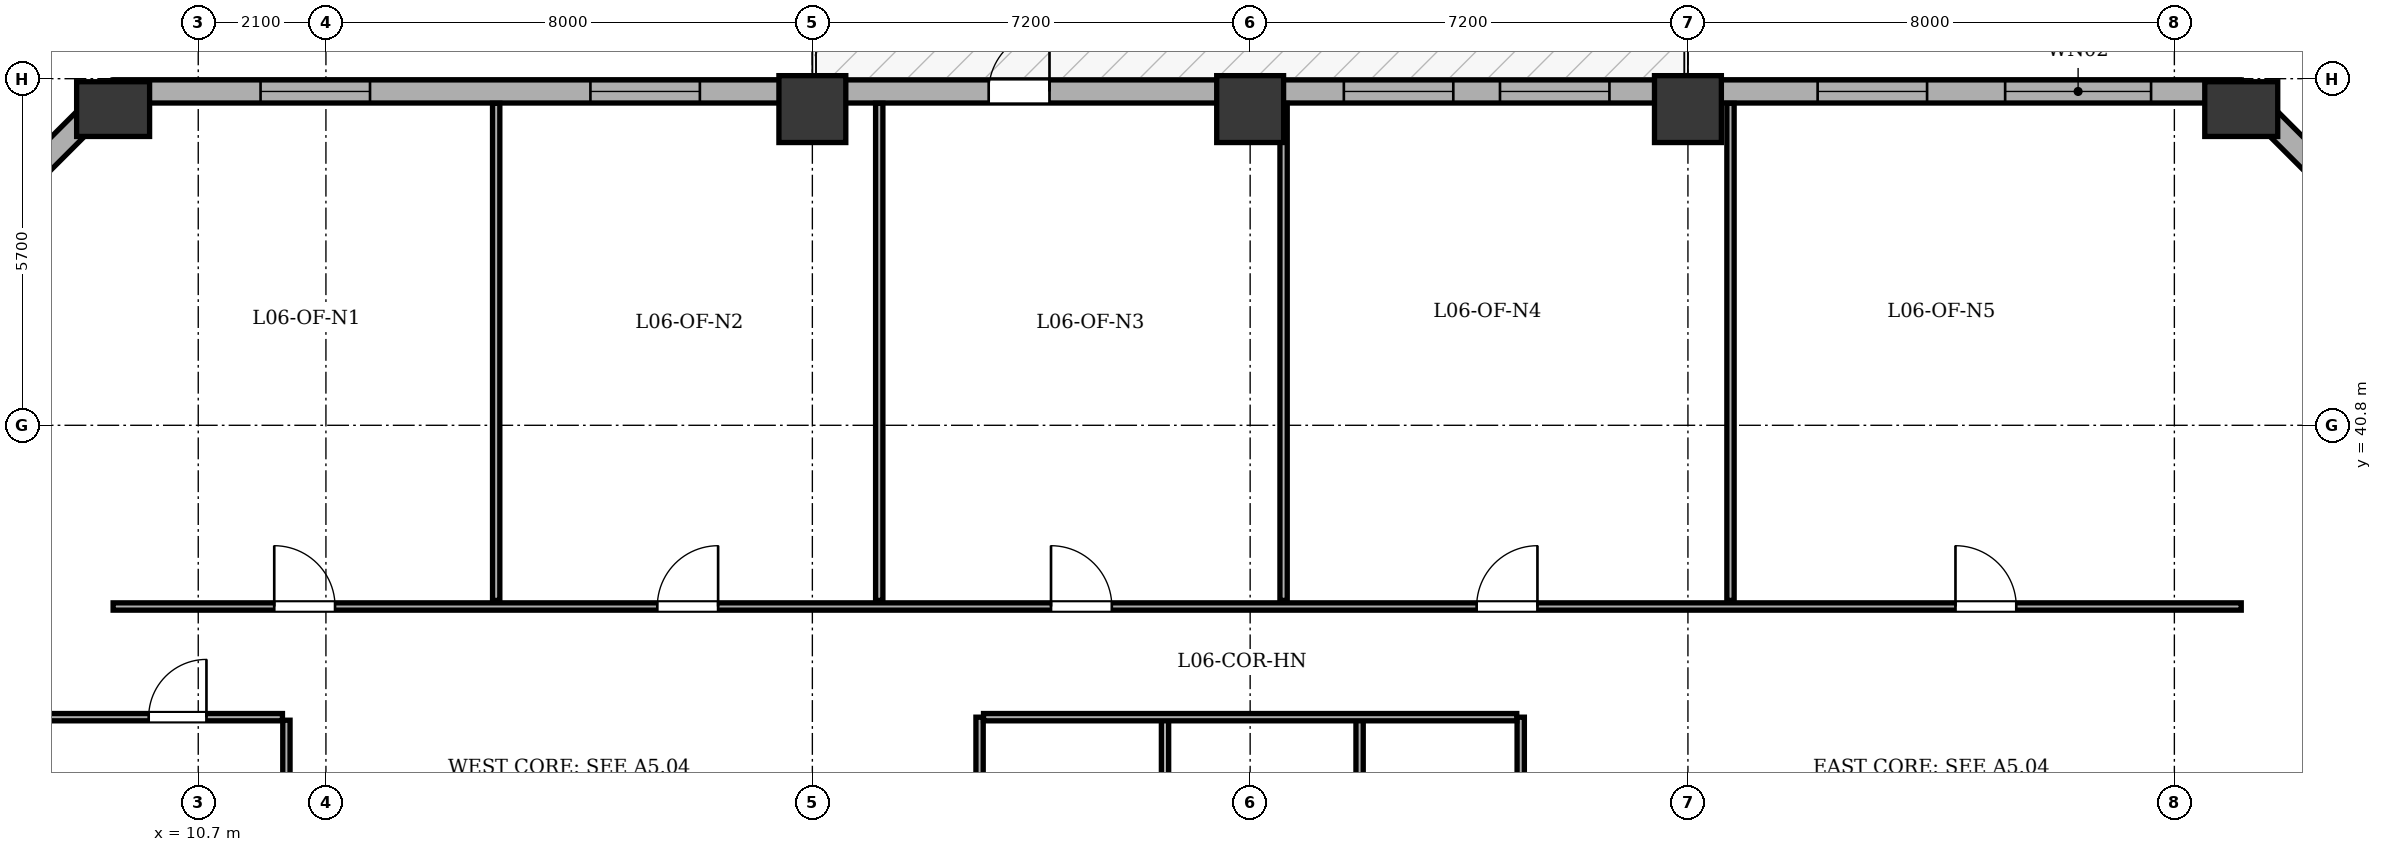
"""IFC4 building model, lengths in metres.
Left out: names, types, materials, properties, quantities, classifications, styles, units other than length and angle.
Written with IfcOpenShell. Run it as: python <this file> out.ifc"""

import sys

from ifc_helpers import new_model, si_unit, direction, frame, frame_2d, origin, origin_2d, place, context, subcontext, project, spatial, rectangle, extrude, element, fill, save


model = new_model("IFC4")
c1 = context("Model", 3, precision=1e-05, world=origin(), true_north=direction((0.0, 1.0)))
c2 = subcontext(c1, "Body", "Model", "MODEL_VIEW")
j1 = project(units=[si_unit("LENGTHUNIT", "METRE"), si_unit("PLANEANGLEUNIT", "RADIAN")], contexts=[c1])
p1 = place(None, origin())
s1 = spatial("IfcSite", under=j1, at=p1, CompositionType="ELEMENT")
p2 = place(p1, origin())
s2 = spatial("IfcBuilding", under=s1, at=p2, CompositionType="ELEMENT")
p3 = place(p2, frame((0.0, 0.0, 28.2)))
s3 = spatial("IfcBuildingStorey", under=s2, at=p3, CompositionType="ELEMENT", Elevation=28.2)
p4 = place(p3, frame((9.3, 46.0, 0.0), z_axis=(0.0, 0.0, 1.0), x_axis=(1.0, 0.0, 0.0)))
e1 = element("IfcColumn", 1, at=p4, inside=s3, PredefinedType="COLUMN", context=c2, shape_type="SweptSolid", body=[
    extrude(rectangle(XDim=0.9, YDim=1.2, at=origin_2d()), origin(), (0.0, 0.0, 1.0), 3.9),
])
for number, where, z_axis, x_axis in (
    (2, (20.8, 46.0, 0.0), (0.0, 0.0, 1.0), (1.0, 0.0, 0.0)),
    (3, (28.0, 46.0, 0.0), (0.0, 0.0, 1.0), (1.0, 0.0, 0.0)),
    (4, (35.2, 46.0, 0.0), (0.0, 0.0, 1.0), (1.0, 0.0, 0.0)),
):
    element("IfcColumn", number, at=place(p3, frame(where, z_axis=z_axis, x_axis=x_axis)), inside=s3, PredefinedType="COLUMN", context=c2, shape_type="SweptSolid", body=[
        extrude(rectangle(XDim=1.1, YDim=1.1, at=origin_2d()), origin(), (0.0, 0.0, 1.0), 3.9),
    ])
p5 = place(p3, frame((44.3, 46.0, 0.0), z_axis=(0.0, 0.0, 1.0), x_axis=(1.0, 0.0, 0.0)))
e5 = element("IfcColumn", 5, at=p5, inside=s3, PredefinedType="COLUMN", context=c2, shape_type="SweptSolid", body=[
    extrude(rectangle(XDim=0.9, YDim=1.2, at=origin_2d()), origin(), (0.0, 0.0, 1.0), 3.9),
])
p6 = place(p3, frame((4.51, 41.5, 0.0), z_axis=(0.0, 0.0, 1.0), x_axis=(0.707106781187, 0.707106781187, 0.0)))
e6 = element("IfcWall", 6, at=p6, inside=s3, PredefinedType="STANDARD", context=c2, shape_type="SweptSolid", body=[
    extrude(rectangle(XDim=6.774, YDim=0.38, at=frame_2d((3.387, 0.0))), origin(), (0.0, 0.0, 1.0), 3.135),
])
p7 = place(p6, frame((2.687, 0.0, 0.8)))
e7 = element("IfcOpeningElement", 7, at=p7, cuts=e6, PredefinedType="OPENING", context=c2, shape_type="SweptSolid", body=[
    extrude(rectangle(XDim=1.4, YDim=1.65, at=frame_2d((0.7, 0.825))), frame((0.0, 0.2, 0.0), z_axis=(0.0, -1.0, 0.0), x_axis=(1.0, 0.0, 0.0)), (0.0, 0.0, 1.0), 0.4),
])
p8 = place(p3, frame((9.3, 46.29, 0.0), z_axis=(0.0, 0.0, 1.0), x_axis=(1.0, 0.0, 0.0)))
e8 = element("IfcWall", 8, at=p8, inside=s3, PredefinedType="STANDARD", context=c2, shape_type="SweptSolid", body=[
    extrude(rectangle(XDim=35.0, YDim=0.38, at=frame_2d((17.5, 0.0))), origin(), (0.0, 0.0, 1.0), 3.135),
])
p9 = place(p8, frame((14.4, 0.0, 0.0)))
e9 = element("IfcOpeningElement", 9, at=p9, cuts=e8, PredefinedType="OPENING", context=c2, shape_type="SweptSolid", body=[
    extrude(rectangle(XDim=1.0, YDim=2.02, at=frame_2d((0.5, 1.01))), frame((0.0, 0.2, 0.0), z_axis=(0.0, -1.0, 0.0), x_axis=(1.0, 0.0, 0.0)), (0.0, 0.0, 1.0), 0.4),
])
p10 = place(p8, frame((2.425, 0.0, 0.8)))
e10 = element("IfcOpeningElement", 10, at=p10, cuts=e8, PredefinedType="OPENING", context=c2, shape_type="SweptSolid", body=[
    extrude(rectangle(XDim=1.8, YDim=1.9, at=frame_2d((0.9, 0.95))), frame((0.0, 0.2, 0.0), z_axis=(0.0, -1.0, 0.0), x_axis=(1.0, 0.0, 0.0)), (0.0, 0.0, 1.0), 0.4),
])
p11 = place(p8, frame((7.85, 0.0, 0.8)))
e11 = element("IfcOpeningElement", 11, at=p11, cuts=e8, PredefinedType="OPENING", context=c2, shape_type="SweptSolid", body=[
    extrude(rectangle(XDim=1.8, YDim=1.9, at=frame_2d((0.9, 0.95))), frame((0.0, 0.2, 0.0), z_axis=(0.0, -1.0, 0.0), x_axis=(1.0, 0.0, 0.0)), (0.0, 0.0, 1.0), 0.4),
])
p12 = place(p8, frame((20.241, 0.0, 0.8)))
e12 = element("IfcOpeningElement", 12, at=p12, cuts=e8, PredefinedType="OPENING", context=c2, shape_type="SweptSolid", body=[
    extrude(rectangle(XDim=1.8, YDim=1.9, at=frame_2d((0.9, 0.95))), frame((0.0, 0.2, 0.0), z_axis=(0.0, -1.0, 0.0), x_axis=(1.0, 0.0, 0.0)), (0.0, 0.0, 1.0), 0.4),
])
p13 = place(p8, frame((22.809, 0.0, 0.8)))
e13 = element("IfcOpeningElement", 13, at=p13, cuts=e8, PredefinedType="OPENING", context=c2, shape_type="SweptSolid", body=[
    extrude(rectangle(XDim=1.8, YDim=1.9, at=frame_2d((0.9, 0.95))), frame((0.0, 0.2, 0.0), z_axis=(0.0, -1.0, 0.0), x_axis=(1.0, 0.0, 0.0)), (0.0, 0.0, 1.0), 0.4),
])
p14 = place(p8, frame((28.033, 0.0, 0.8)))
e14 = element("IfcOpeningElement", 14, at=p14, cuts=e8, PredefinedType="OPENING", context=c2, shape_type="SweptSolid", body=[
    extrude(rectangle(XDim=1.8, YDim=1.9, at=frame_2d((0.9, 0.95))), frame((0.0, 0.2, 0.0), z_axis=(0.0, -1.0, 0.0), x_axis=(1.0, 0.0, 0.0)), (0.0, 0.0, 1.0), 0.4),
])
p15 = place(p8, frame((31.117, 0.0, 0.8)))
e15 = element("IfcOpeningElement", 15, at=p15, cuts=e8, PredefinedType="OPENING", context=c2, shape_type="SweptSolid", body=[
    extrude(rectangle(XDim=2.4, YDim=1.9, at=frame_2d((1.2, 0.95))), frame((0.0, 0.2, 0.0), z_axis=(0.0, -1.0, 0.0), x_axis=(1.0, 0.0, 0.0)), (0.0, 0.0, 1.0), 0.4),
])
p16 = place(p3, frame((44.3, 46.29, 0.0), z_axis=(0.0, 0.0, 1.0), x_axis=(0.707106781187, -0.707106781187, 0.0)))
e16 = element("IfcWall", 16, at=p16, inside=s3, PredefinedType="STANDARD", context=c2, shape_type="SweptSolid", body=[
    extrude(rectangle(XDim=6.774, YDim=0.38, at=frame_2d((3.387, 0.0))), origin(), (0.0, 0.0, 1.0), 3.135),
])
p17 = place(p16, frame((2.687, 0.0, 0.8)))
e17 = element("IfcOpeningElement", 17, at=p17, cuts=e16, PredefinedType="OPENING", context=c2, shape_type="SweptSolid", body=[
    extrude(rectangle(XDim=1.4, YDim=1.65, at=frame_2d((0.7, 0.825))), frame((0.0, 0.2, 0.0), z_axis=(0.0, -1.0, 0.0), x_axis=(1.0, 0.0, 0.0)), (0.0, 0.0, 1.0), 0.4),
])
for number, where, z_axis, x_axis in (
    (18, (23.55, 24.715, 0.0), (0.0, 0.0, 1.0), (0.0, 1.0, 0.0)),
    (19, (32.45, 24.715, 0.0), (0.0, 0.0, 1.0), (0.0, 1.0, 0.0)),
    (20, (26.6, 24.715, 0.0), (0.0, 0.0, 1.0), (0.0, 1.0, 0.0)),
):
    element("IfcWall", number, at=place(p3, frame(where, z_axis=z_axis, x_axis=x_axis)), inside=s3, PredefinedType="PARTITIONING", context=c2, shape_type="SweptSolid", body=[
        extrude(rectangle(XDim=11.285, YDim=0.12, at=frame_2d((5.643, 0.0))), origin(), (0.0, 0.0, 1.0), 3.6),
    ])
p18 = place(p3, frame((29.8, 24.715, 0.0), z_axis=(0.0, 0.0, 1.0), x_axis=(0.0, 1.0, 0.0)))
e21 = element("IfcWall", 21, at=p18, inside=s3, PredefinedType="PARTITIONING", context=c2, shape_type="SweptSolid", body=[
    extrude(rectangle(XDim=11.285, YDim=0.12, at=frame_2d((5.643, 0.0))), origin(), (0.0, 0.0, 1.0), 3.135),
])
p19 = place(p3, frame((23.615, 36.0, 0.0), z_axis=(0.0, 0.0, 1.0), x_axis=(1.0, 0.0, 0.0)))
e22 = element("IfcWall", 22, at=p19, inside=s3, PredefinedType="PARTITIONING", context=c2, shape_type="SweptSolid", body=[
    extrude(rectangle(XDim=8.77, YDim=0.12, at=frame_2d((4.385, 0.0))), origin(), (0.0, 0.0, 1.0), 3.6),
])
p20 = place(p3, frame((9.3, 37.82, 0.0), z_axis=(0.0, 0.0, 1.0), x_axis=(1.0, 0.0, 0.0)))
e23 = element("IfcWall", 23, at=p20, inside=s3, PredefinedType="PARTITIONING", context=c2, shape_type="SweptSolid", body=[
    extrude(rectangle(XDim=35.0, YDim=0.12, at=frame_2d((17.5, 0.0))), origin(), (0.0, 0.0, 1.0), 3.6),
])
p21 = place(p20, frame((2.65, 0.0, 0.0)))
e24 = element("IfcOpeningElement", 24, at=p21, cuts=e23, PredefinedType="OPENING", context=c2, shape_type="SweptSolid", body=[
    extrude(rectangle(XDim=1.0, YDim=2.1, at=frame_2d((0.5, 1.05))), frame((0.0, 0.07, 0.0), z_axis=(0.0, -1.0, 0.0), x_axis=(1.0, 0.0, 0.0)), (0.0, 0.0, 1.0), 0.14),
])
p22 = place(p20, frame((8.95, 0.0, 0.0)))
e25 = element("IfcOpeningElement", 25, at=p22, cuts=e23, PredefinedType="OPENING", context=c2, shape_type="SweptSolid", body=[
    extrude(rectangle(XDim=1.0, YDim=2.1, at=frame_2d((0.5, 1.05))), frame((0.0, 0.07, 0.0), z_axis=(0.0, -1.0, 0.0), x_axis=(1.0, 0.0, 0.0)), (0.0, 0.0, 1.0), 0.14),
])
p23 = place(p20, frame((15.425, 0.0, 0.0)))
e26 = element("IfcOpeningElement", 26, at=p23, cuts=e23, PredefinedType="OPENING", context=c2, shape_type="SweptSolid", body=[
    extrude(rectangle(XDim=1.0, YDim=2.1, at=frame_2d((0.5, 1.05))), frame((0.0, 0.07, 0.0), z_axis=(0.0, -1.0, 0.0), x_axis=(1.0, 0.0, 0.0)), (0.0, 0.0, 1.0), 0.14),
])
p24 = place(p20, frame((22.425, 0.0, 0.0)))
e27 = element("IfcOpeningElement", 27, at=p24, cuts=e23, PredefinedType="OPENING", context=c2, shape_type="SweptSolid", body=[
    extrude(rectangle(XDim=1.0, YDim=2.1, at=frame_2d((0.5, 1.05))), frame((0.0, 0.07, 0.0), z_axis=(0.0, -1.0, 0.0), x_axis=(1.0, 0.0, 0.0)), (0.0, 0.0, 1.0), 0.14),
])
p25 = place(p20, frame((30.3, 0.0, 0.0)))
e28 = element("IfcOpeningElement", 28, at=p25, cuts=e23, PredefinedType="OPENING", context=c2, shape_type="SweptSolid", body=[
    extrude(rectangle(XDim=1.0, YDim=2.1, at=frame_2d((0.5, 1.05))), frame((0.0, 0.07, 0.0), z_axis=(0.0, -1.0, 0.0), x_axis=(1.0, 0.0, 0.0)), (0.0, 0.0, 1.0), 0.14),
])
for number, where, z_axis, x_axis in (
    (29, (15.6, 37.92, 0.0), (0.0, 0.0, 1.0), (0.0, 1.0, 0.0)),
    (30, (21.9, 37.92, 0.0), (0.0, 0.0, 1.0), (0.0, 1.0, 0.0)),
    (31, (28.55, 37.92, 0.0), (0.0, 0.0, 1.0), (0.0, 1.0, 0.0)),
    (32, (35.9, 37.92, 0.0), (0.0, 0.0, 1.0), (0.0, 1.0, 0.0)),
):
    element("IfcWall", number, at=place(p3, frame(where, z_axis=z_axis, x_axis=x_axis)), inside=s3, PredefinedType="PARTITIONING", context=c2, shape_type="SweptSolid", body=[
        extrude(rectangle(XDim=8.175, YDim=0.12, at=frame_2d((4.087, 0.0))), origin(), (0.0, 0.0, 1.0), 3.6),
    ])
p26 = place(p3, frame((12.15, 18.45, 0.0), z_axis=(0.0, 0.0, 1.0), x_axis=(0.0, 1.0, 0.0)))
e33 = element("IfcWall", 33, at=p26, inside=s3, PredefinedType="PARTITIONING", context=c2, shape_type="SweptSolid", body=[
    extrude(rectangle(XDim=17.5, YDim=0.12, at=frame_2d((8.75, 0.0))), origin(), (0.0, 0.0, 1.0), 3.6),
])
p27 = place(p3, frame((4.705, 36.0, 0.0), z_axis=(0.0, 0.0, 1.0), x_axis=(1.0, 0.0, 0.0)))
e34 = element("IfcWall", 34, at=p27, inside=s3, PredefinedType="PARTITIONING", context=c2, shape_type="SweptSolid", body=[
    extrude(rectangle(XDim=7.38, YDim=0.12, at=frame_2d((3.69, 0.0))), origin(), (0.0, 0.0, 1.0), 3.6),
])
p28 = place(p27, frame((5.18, 0.0, 0.0)))
e35 = element("IfcOpeningElement", 35, at=p28, cuts=e34, PredefinedType="OPENING", context=c2, shape_type="SweptSolid", body=[
    extrude(rectangle(XDim=0.95, YDim=2.1, at=frame_2d((0.475, 1.05))), frame((0.0, 0.07, 0.0), z_axis=(0.0, -1.0, 0.0), x_axis=(1.0, 0.0, 0.0)), (0.0, 0.0, 1.0), 0.14),
])
p29 = place(p9, origin())
e36 = element("IfcDoor", 36, at=p29, inside=s3, OperationType="SINGLE_SWING_RIGHT", PredefinedType="DOOR", context=c2, shape_type="SweptSolid", body=[
    extrude(rectangle(XDim=1.0, YDim=2.02, at=frame_2d((0.5, 1.01))), frame((0.0, 0.025, 0.0), z_axis=(0.0, -1.0, 0.0), x_axis=(1.0, 0.0, 0.0)), (0.0, 0.0, 1.0), 0.05),
])
fill(e9, e36)
p30 = place(p10, origin())
e37 = element("IfcWindow", 37, at=p30, inside=s3, PartitioningType="SINGLE_PANEL", PredefinedType="WINDOW", context=c2, shape_type="SweptSolid", body=[
    extrude(rectangle(XDim=1.8, YDim=1.9, at=frame_2d((0.9, 0.95))), frame((0.0, -0.01, 0.0), z_axis=(0.0, -1.0, 0.0), x_axis=(1.0, 0.0, 0.0)), (0.0, 0.0, 1.0), 0.06),
])
fill(e10, e37)
p31 = place(p11, origin())
e38 = element("IfcWindow", 38, at=p31, inside=s3, PartitioningType="SINGLE_PANEL", PredefinedType="WINDOW", context=c2, shape_type="SweptSolid", body=[
    extrude(rectangle(XDim=1.8, YDim=1.9, at=frame_2d((0.9, 0.95))), frame((0.0, -0.01, 0.0), z_axis=(0.0, -1.0, 0.0), x_axis=(1.0, 0.0, 0.0)), (0.0, 0.0, 1.0), 0.06),
])
fill(e11, e38)
p32 = place(p12, origin())
e39 = element("IfcWindow", 39, at=p32, inside=s3, PartitioningType="SINGLE_PANEL", PredefinedType="WINDOW", context=c2, shape_type="SweptSolid", body=[
    extrude(rectangle(XDim=1.8, YDim=1.9, at=frame_2d((0.9, 0.95))), frame((0.0, -0.01, 0.0), z_axis=(0.0, -1.0, 0.0), x_axis=(1.0, 0.0, 0.0)), (0.0, 0.0, 1.0), 0.06),
])
fill(e12, e39)
p33 = place(p13, origin())
e40 = element("IfcWindow", 40, at=p33, inside=s3, PartitioningType="SINGLE_PANEL", PredefinedType="WINDOW", context=c2, shape_type="SweptSolid", body=[
    extrude(rectangle(XDim=1.8, YDim=1.9, at=frame_2d((0.9, 0.95))), frame((0.0, -0.01, 0.0), z_axis=(0.0, -1.0, 0.0), x_axis=(1.0, 0.0, 0.0)), (0.0, 0.0, 1.0), 0.06),
])
fill(e13, e40)
p34 = place(p14, origin())
e41 = element("IfcWindow", 41, at=p34, inside=s3, PartitioningType="SINGLE_PANEL", PredefinedType="WINDOW", context=c2, shape_type="SweptSolid", body=[
    extrude(rectangle(XDim=1.8, YDim=1.9, at=frame_2d((0.9, 0.95))), frame((0.0, -0.01, 0.0), z_axis=(0.0, -1.0, 0.0), x_axis=(1.0, 0.0, 0.0)), (0.0, 0.0, 1.0), 0.06),
])
fill(e14, e41)
p35 = place(p15, origin())
e42 = element("IfcWindow", 42, at=p35, inside=s3, PartitioningType="SINGLE_PANEL", PredefinedType="WINDOW", context=c2, shape_type="SweptSolid", body=[
    extrude(rectangle(XDim=2.4, YDim=1.9, at=frame_2d((1.2, 0.95))), frame((0.0, -0.01, 0.0), z_axis=(0.0, -1.0, 0.0), x_axis=(1.0, 0.0, 0.0)), (0.0, 0.0, 1.0), 0.06),
])
fill(e15, e42)
p36 = place(p21, origin())
e43 = element("IfcDoor", 43, at=p36, inside=s3, OperationType="SINGLE_SWING_LEFT", PredefinedType="DOOR", context=c2, shape_type="SweptSolid", body=[
    extrude(rectangle(XDim=1.0, YDim=2.1, at=frame_2d((0.5, 1.05))), frame((0.0, 0.025, 0.0), z_axis=(0.0, -1.0, 0.0), x_axis=(1.0, 0.0, 0.0)), (0.0, 0.0, 1.0), 0.05),
])
fill(e24, e43)
p37 = place(p22, origin())
e44 = element("IfcDoor", 44, at=p37, inside=s3, OperationType="SINGLE_SWING_RIGHT", PredefinedType="DOOR", context=c2, shape_type="SweptSolid", body=[
    extrude(rectangle(XDim=1.0, YDim=2.1, at=frame_2d((0.5, 1.05))), frame((0.0, 0.025, 0.0), z_axis=(0.0, -1.0, 0.0), x_axis=(1.0, 0.0, 0.0)), (0.0, 0.0, 1.0), 0.05),
])
fill(e25, e44)
p38 = place(p23, origin())
e45 = element("IfcDoor", 45, at=p38, inside=s3, OperationType="SINGLE_SWING_LEFT", PredefinedType="DOOR", context=c2, shape_type="SweptSolid", body=[
    extrude(rectangle(XDim=1.0, YDim=2.1, at=frame_2d((0.5, 1.05))), frame((0.0, 0.025, 0.0), z_axis=(0.0, -1.0, 0.0), x_axis=(1.0, 0.0, 0.0)), (0.0, 0.0, 1.0), 0.05),
])
fill(e26, e45)
p39 = place(p24, origin())
e46 = element("IfcDoor", 46, at=p39, inside=s3, OperationType="SINGLE_SWING_RIGHT", PredefinedType="DOOR", context=c2, shape_type="SweptSolid", body=[
    extrude(rectangle(XDim=1.0, YDim=2.1, at=frame_2d((0.5, 1.05))), frame((0.0, 0.025, 0.0), z_axis=(0.0, -1.0, 0.0), x_axis=(1.0, 0.0, 0.0)), (0.0, 0.0, 1.0), 0.05),
])
fill(e27, e46)
p40 = place(p25, origin())
e47 = element("IfcDoor", 47, at=p40, inside=s3, OperationType="SINGLE_SWING_LEFT", PredefinedType="DOOR", context=c2, shape_type="SweptSolid", body=[
    extrude(rectangle(XDim=1.0, YDim=2.1, at=frame_2d((0.5, 1.05))), frame((0.0, 0.025, 0.0), z_axis=(0.0, -1.0, 0.0), x_axis=(1.0, 0.0, 0.0)), (0.0, 0.0, 1.0), 0.05),
])
fill(e28, e47)
p41 = place(p28, origin())
e48 = element("IfcDoor", 48, at=p41, inside=s3, OperationType="SINGLE_SWING_RIGHT", PredefinedType="DOOR", context=c2, shape_type="SweptSolid", body=[
    extrude(rectangle(XDim=0.95, YDim=2.1, at=frame_2d((0.475, 1.05))), frame((0.0, 0.025, 0.0), z_axis=(0.0, -1.0, 0.0), x_axis=(1.0, 0.0, 0.0)), (0.0, 0.0, 1.0), 0.05),
])
fill(e35, e48)
save(model, sys.argv[1])
